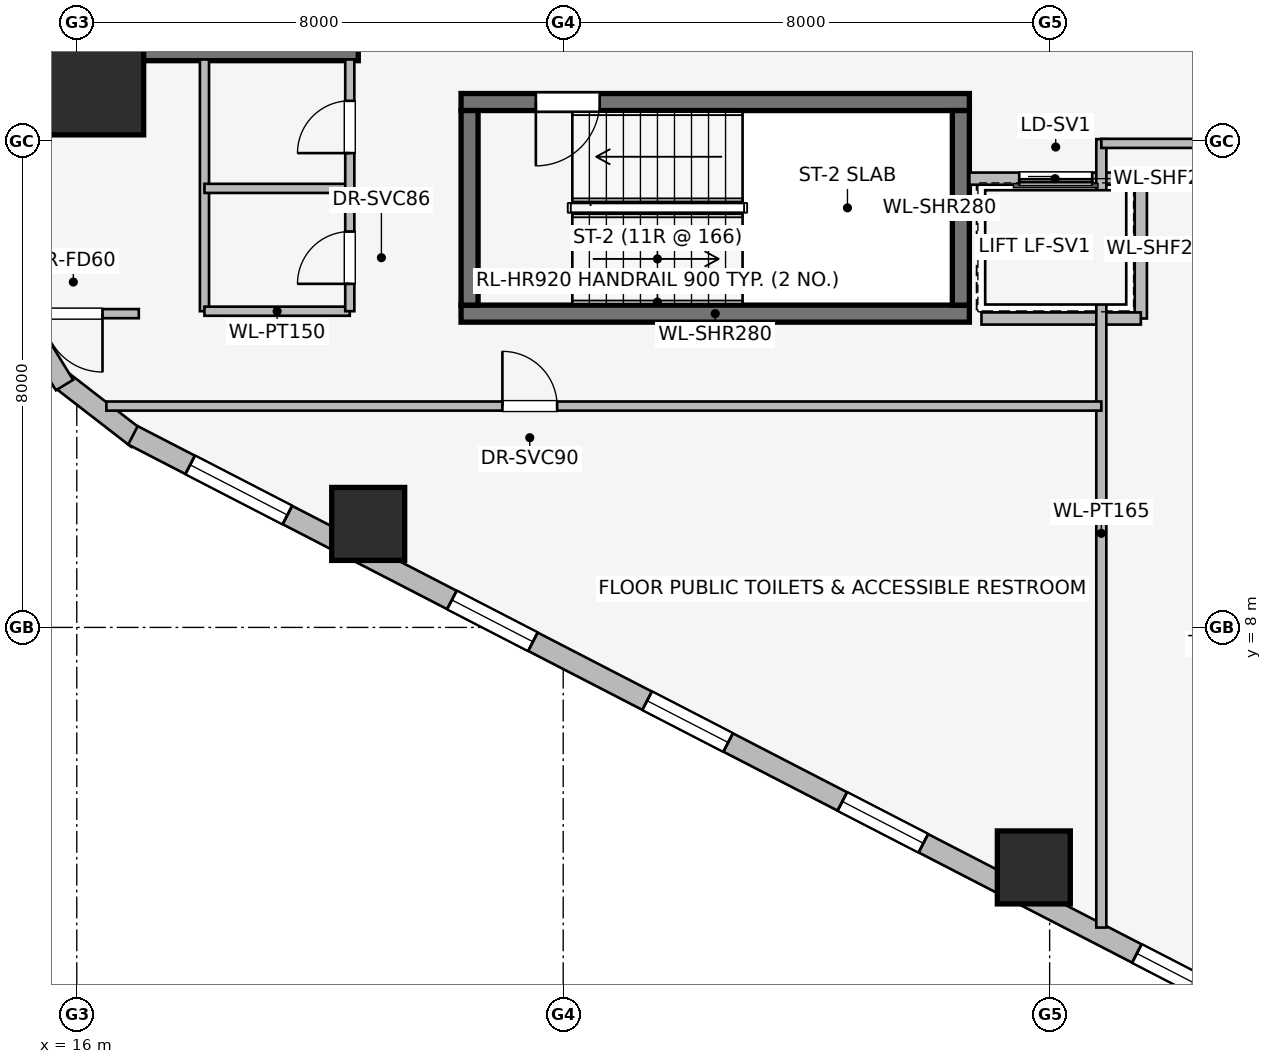
"""IFC4 building model, lengths in metres.
Left out: names, types, materials, properties, quantities, classifications, styles, units other than length and angle.
Written with IfcOpenShell. Run it as: python <this file> out.ifc"""

import sys

from ifc_helpers import new_model, si_unit, direction, frame, frame_2d, origin, origin_2d, place, context, subcontext, project, spatial, rectangle, extrude, element, fill, save


model = new_model("IFC4")
c1 = context("Model", 3, precision=1e-05, world=origin(), true_north=direction((0.0, 1.0)))
c2 = subcontext(c1, "Body", "Model", "MODEL_VIEW")
j1 = project(units=[si_unit("LENGTHUNIT", "METRE"), si_unit("PLANEANGLEUNIT", "RADIAN")], contexts=[c1])
p1 = place(None, origin())
s1 = spatial("IfcSite", under=j1, at=p1, CompositionType="ELEMENT")
p2 = place(p1, origin())
s2 = spatial("IfcBuilding", under=s1, at=p2, CompositionType="ELEMENT")
p3 = place(p2, frame((0.0, 0.0, 52.55)))
s3 = spatial("IfcBuildingStorey", under=s2, at=p3, CompositionType="ELEMENT", Elevation=52.55)
p4 = place(p3, frame((16.87, 17.46, 0.0), z_axis=(0.0, 0.0, 1.0), x_axis=(1.0, 0.0, 0.0)))
e1 = element("IfcWall", 1, at=p4, inside=s3, PredefinedType="SHEAR", context=c2, shape_type="SweptSolid", body=[
    extrude(rectangle(XDim=3.76, YDim=0.28, at=frame_2d((1.88, 0.0))), origin(), (0.0, 0.0, 1.0), 3.65),
])
p5 = place(p3, frame((22.32, 13.16, 0.0), z_axis=(0.0, 0.0, 1.0), x_axis=(1.0, 0.0, 0.0)))
e2 = element("IfcWall", 2, at=p5, inside=s3, PredefinedType="SHEAR", context=c2, shape_type="SweptSolid", body=[
    extrude(rectangle(XDim=8.36, YDim=0.28, at=frame_2d((4.18, 0.0))), origin(), (0.0, 0.0, 1.0), 3.65),
])
p6 = place(p3, frame((30.68, 16.64, 0.0), z_axis=(0.0, 0.0, 1.0), x_axis=(-1.0, 0.0, 0.0)))
e3 = element("IfcWall", 3, at=p6, inside=s3, PredefinedType="SHEAR", context=c2, shape_type="SweptSolid", body=[
    extrude(rectangle(XDim=8.36, YDim=0.28, at=frame_2d((4.18, 0.0))), origin(), (0.0, 0.0, 1.0), 3.65),
])
p7 = place(p6, frame((6.08, 0.0, 0.0)))
e4 = element("IfcOpeningElement", 4, at=p7, cuts=e3, PredefinedType="OPENING", context=c2, shape_type="SweptSolid", body=[
    extrude(rectangle(XDim=1.05, YDim=2.0, at=frame_2d((0.525, 1.0))), frame((0.0, 0.15, 0.0), z_axis=(0.0, -1.0, 0.0), x_axis=(1.0, 0.0, 0.0)), (0.0, 0.0, 1.0), 0.3),
])
for number, where, z_axis, x_axis in (
    (5, (22.46, 16.5, 0.0), (0.0, 0.0, 1.0), (0.0, -1.0, 0.0)),
    (6, (30.54, 13.3, 0.0), (0.0, 0.0, 1.0), (0.0, 1.0, 0.0)),
):
    element("IfcWall", number, at=place(p3, frame(where, z_axis=z_axis, x_axis=x_axis)), inside=s3, PredefinedType="SHEAR", context=c2, shape_type="SweptSolid", body=[
        extrude(rectangle(XDim=3.2, YDim=0.28, at=frame_2d((1.6, 0.0))), origin(), (0.0, 0.0, 1.0), 3.65),
    ])
p8 = place(p3, frame((16.3, 16.9, 0.0), z_axis=(0.0, 0.0, 1.0), x_axis=(1.0, 0.0, 0.0)))
e7 = element("IfcColumn", 7, at=p8, inside=s3, PredefinedType="COLUMN", context=c2, shape_type="SweptSolid", body=[
    extrude(rectangle(XDim=1.6, YDim=1.6, at=origin_2d()), origin(), (0.0, 0.0, 1.0), 3.65),
])
for number, where, z_axis, x_axis in (
    (8, (20.793, 9.702, 0.0), (0.0, 0.0, 1.0), (1.0, 0.0, 0.0)),
    (9, (31.74, 4.053, 0.0), (0.0, 0.0, 1.0), (1.0, 0.0, 0.0)),
):
    element("IfcColumn", number, at=place(p3, frame(where, z_axis=z_axis, x_axis=x_axis)), inside=s3, PredefinedType="COLUMN", context=c2, shape_type="SweptSolid", body=[
        extrude(rectangle(XDim=1.2, YDim=1.2, at=origin_2d()), origin(), (0.0, 0.0, 1.0), 3.65),
    ])
p9 = place(p3, frame((16.998, 11.099, 0.0), z_axis=(0.0, 0.0, 1.0), x_axis=(-0.790691856293, 0.61221433207, 0.0)))
e10 = element("IfcWall", 10, at=p9, inside=s3, PredefinedType="STANDARD", context=c2, shape_type="SweptSolid", body=[
    extrude(rectangle(XDim=1.676, YDim=0.33, at=frame_2d((0.838, 0.0))), origin(), (0.0, 0.0, 1.0), 3.36),
])
p10 = place(p3, frame((15.798, 11.985, 0.0), z_axis=(0.0, 0.0, 1.0), x_axis=(-0.520584129191, 0.853810379671, 0.0)))
e11 = element("IfcWall", 11, at=p10, inside=s3, PredefinedType="STANDARD", context=c2, shape_type="SweptSolid", body=[
    extrude(rectangle(XDim=1.677, YDim=0.33, at=frame_2d((0.838, 0.0))), origin(), (0.0, 0.0, 1.0), 3.36),
])
p11 = place(p3, frame((35.169, 1.743, 0.0), z_axis=(0.0, 0.0, 1.0), x_axis=(-0.888634413993, 0.458616264721, 0.0)))
e12 = element("IfcWall", 12, at=p11, inside=s3, PredefinedType="STANDARD", context=c2, shape_type="SweptSolid", body=[
    extrude(rectangle(XDim=20.531, YDim=0.34, at=frame_2d((10.266, 0.0))), origin(), (0.0, 0.0, 1.0), 2.654),
])
p12 = place(p11, frame((0.902, 0.0, 0.75)))
e13 = element("IfcOpeningElement", 13, at=p12, cuts=e12, PredefinedType="OPENING", context=c2, shape_type="SweptSolid", body=[
    extrude(rectangle(XDim=1.05, YDim=1.4, at=frame_2d((0.525, 0.7))), frame((0.0, 0.18, 0.0), z_axis=(0.0, -1.0, 0.0), x_axis=(1.0, 0.0, 0.0)), (0.0, 0.0, 1.0), 0.36),
])
p13 = place(p11, frame((5.903, 0.0, 0.75)))
e14 = element("IfcOpeningElement", 14, at=p13, cuts=e12, PredefinedType="OPENING", context=c2, shape_type="SweptSolid", body=[
    extrude(rectangle(XDim=1.5, YDim=1.5, at=frame_2d((0.75, 0.75))), frame((0.0, 0.18, 0.0), z_axis=(0.0, -1.0, 0.0), x_axis=(1.0, 0.0, 0.0)), (0.0, 0.0, 1.0), 0.36),
])
p14 = place(p11, frame((9.516, 0.0, 0.75)))
e15 = element("IfcOpeningElement", 15, at=p14, cuts=e12, PredefinedType="OPENING", context=c2, shape_type="SweptSolid", body=[
    extrude(rectangle(XDim=1.5, YDim=1.5, at=frame_2d((0.75, 0.75))), frame((0.0, 0.18, 0.0), z_axis=(0.0, -1.0, 0.0), x_axis=(1.0, 0.0, 0.0)), (0.0, 0.0, 1.0), 0.36),
])
p15 = place(p11, frame((13.129, 0.0, 0.75)))
e16 = element("IfcOpeningElement", 16, at=p15, cuts=e12, PredefinedType="OPENING", context=c2, shape_type="SweptSolid", body=[
    extrude(rectangle(XDim=1.5, YDim=1.5, at=frame_2d((0.75, 0.75))), frame((0.0, 0.18, 0.0), z_axis=(0.0, -1.0, 0.0), x_axis=(1.0, 0.0, 0.0)), (0.0, 0.0, 1.0), 0.36),
])
p16 = place(p11, frame((17.673, 0.0, 0.75)))
e17 = element("IfcOpeningElement", 17, at=p16, cuts=e12, PredefinedType="OPENING", context=c2, shape_type="SweptSolid", body=[
    extrude(rectangle(XDim=1.8, YDim=1.5, at=frame_2d((0.9, 0.75))), frame((0.0, 0.18, 0.0), z_axis=(0.0, -1.0, 0.0), x_axis=(1.0, 0.0, 0.0)), (0.0, 0.0, 1.0), 0.36),
])
p17 = place(p3, frame((33.5, 15.38, 0.0), z_axis=(0.0, 0.0, 1.0), x_axis=(-1.0, 0.0, 0.0)))
e18 = element("IfcWall", 18, at=p17, inside=s3, PredefinedType="PARTITIONING", context=c2, shape_type="SweptSolid", body=[
    extrude(rectangle(XDim=2.82, YDim=0.2, at=frame_2d((1.41, 0.0))), origin(), (0.0, 0.0, 1.0), 3.36),
])
p18 = place(p17, frame((0.8, 0.0, 0.0)))
e19 = element("IfcOpeningElement", 19, at=p18, cuts=e18, PredefinedType="OPENING", context=c2, shape_type="SweptSolid", body=[
    extrude(rectangle(XDim=1.2, YDim=2.2, at=frame_2d((0.6, 1.1))), frame((0.0, 0.11, 0.0), z_axis=(0.0, -1.0, 0.0), x_axis=(1.0, 0.0, 0.0)), (0.0, 0.0, 1.0), 0.22),
])
p19 = place(p3, frame((33.5, 13.08, 0.0), z_axis=(0.0, 0.0, 1.0), x_axis=(0.0, 1.0, 0.0)))
e20 = element("IfcWall", 20, at=p19, inside=s3, PredefinedType="PARTITIONING", context=c2, shape_type="SweptSolid", body=[
    extrude(rectangle(XDim=2.3, YDim=0.2, at=frame_2d((1.15, 0.0))), origin(), (0.0, 0.0, 1.0), 3.36),
])
p20 = place(p3, frame((30.879, 13.08, 0.0), z_axis=(0.0, 0.0, 1.0), x_axis=(1.0, 0.0, 0.0)))
e21 = element("IfcWall", 21, at=p20, inside=s3, PredefinedType="PARTITIONING", context=c2, shape_type="SweptSolid", body=[
    extrude(rectangle(XDim=2.621, YDim=0.2, at=frame_2d((1.311, 0.0))), origin(), (0.0, 0.0, 1.0), 3.36),
])
p21 = place(p3, frame((18.1, 17.34, 0.0), z_axis=(0.0, 0.0, 1.0), x_axis=(0.0, -1.0, 0.0)))
e22 = element("IfcWall", 22, at=p21, inside=s3, PredefinedType="PARTITIONING", context=c2, shape_type="SweptSolid", body=[
    extrude(rectangle(XDim=4.14, YDim=0.15, at=frame_2d((2.07, 0.0))), origin(), (0.0, 0.0, 1.0), 3.36),
])
for number, where, z_axis, x_axis in (
    (23, (18.1, 13.2, 0.0), (0.0, 0.0, 1.0), (1.0, 0.0, 0.0)),
    (24, (18.1, 15.22, 0.0), (0.0, 0.0, 1.0), (1.0, 0.0, 0.0)),
):
    element("IfcWall", number, at=place(p3, frame(where, z_axis=z_axis, x_axis=x_axis)), inside=s3, PredefinedType="PARTITIONING", context=c2, shape_type="SweptSolid", body=[
        extrude(rectangle(XDim=2.39, YDim=0.15, at=frame_2d((1.195, 0.0))), origin(), (0.0, 0.0, 1.0), 3.36),
    ])
p22 = place(p3, frame((20.49, 13.2, 0.0), z_axis=(0.0, 0.0, 1.0), x_axis=(0.0, 1.0, 0.0)))
e25 = element("IfcWall", 25, at=p22, inside=s3, PredefinedType="PARTITIONING", context=c2, shape_type="SweptSolid", body=[
    extrude(rectangle(XDim=4.14, YDim=0.15, at=frame_2d((2.07, 0.0))), origin(), (0.0, 0.0, 1.0), 3.36),
])
p23 = place(p22, frame((0.45, 0.0, 0.0)))
e26 = element("IfcOpeningElement", 26, at=p23, cuts=e25, PredefinedType="OPENING", context=c2, shape_type="SweptSolid", body=[
    extrude(rectangle(XDim=0.86, YDim=2.0, at=frame_2d((0.43, 1.0))), frame((0.0, 0.085, 0.0), z_axis=(0.0, -1.0, 0.0), x_axis=(1.0, 0.0, 0.0)), (0.0, 0.0, 1.0), 0.17),
])
p24 = place(p22, frame((2.6, 0.0, 0.0)))
e27 = element("IfcOpeningElement", 27, at=p24, cuts=e25, PredefinedType="OPENING", context=c2, shape_type="SweptSolid", body=[
    extrude(rectangle(XDim=0.86, YDim=2.0, at=frame_2d((0.43, 1.0))), frame((0.0, 0.085, 0.0), z_axis=(0.0, -1.0, 0.0), x_axis=(1.0, 0.0, 0.0)), (0.0, 0.0, 1.0), 0.17),
])
p25 = place(p3, frame((32.85, 3.064, 0.0), z_axis=(0.0, 0.0, 1.0), x_axis=(0.0, 1.0, 0.0)))
e28 = element("IfcWall", 28, at=p25, inside=s3, PredefinedType="PARTITIONING", context=c2, shape_type="SweptSolid", body=[
    extrude(rectangle(XDim=12.966, YDim=0.165, at=frame_2d((6.483, 0.0))), origin(), (0.0, 0.0, 1.0), 3.36),
])
p26 = place(p3, frame((16.487, 11.64, 0.0), z_axis=(0.0, 0.0, 1.0), x_axis=(1.0, 0.0, 0.0)))
e29 = element("IfcWall", 29, at=p26, inside=s3, PredefinedType="PARTITIONING", context=c2, shape_type="SweptSolid", body=[
    extrude(rectangle(XDim=16.363, YDim=0.15, at=frame_2d((8.182, 0.0))), origin(), (0.0, 0.0, 1.0), 3.36),
])
p27 = place(p26, frame((6.513, 0.0, 0.0)))
e30 = element("IfcOpeningElement", 30, at=p27, cuts=e29, PredefinedType="OPENING", context=c2, shape_type="SweptSolid", body=[
    extrude(rectangle(XDim=0.9, YDim=2.0, at=frame_2d((0.45, 1.0))), frame((0.0, 0.085, 0.0), z_axis=(0.0, -1.0, 0.0), x_axis=(1.0, 0.0, 0.0)), (0.0, 0.0, 1.0), 0.17),
])
p28 = place(p3, frame((17.02, 13.16, 0.0), z_axis=(0.0, 0.0, 1.0), x_axis=(-1.0, 0.0, 0.0)))
e31 = element("IfcWall", 31, at=p28, inside=s3, PredefinedType="PARTITIONING", context=c2, shape_type="SweptSolid", body=[
    extrude(rectangle(XDim=2.12, YDim=0.15, at=frame_2d((1.06, 0.0))), origin(), (0.0, 0.0, 1.0), 3.36),
])
p29 = place(p28, frame((0.597, 0.0, 0.0)))
e32 = element("IfcOpeningElement", 32, at=p29, cuts=e31, PredefinedType="OPENING", context=c2, shape_type="SweptSolid", body=[
    extrude(rectangle(XDim=0.96, YDim=2.0, at=frame_2d((0.48, 1.0))), frame((0.0, 0.085, 0.0), z_axis=(0.0, -1.0, 0.0), x_axis=(1.0, 0.0, 0.0)), (0.0, 0.0, 1.0), 0.17),
])
p30 = place(p3, frame((32.85, 15.96, 0.0), z_axis=(0.0, 0.0, 1.0), x_axis=(1.0, 0.0, 0.0)))
e33 = element("IfcWall", 33, at=p30, inside=s3, PredefinedType="PARTITIONING", context=c2, shape_type="SweptSolid", body=[
    extrude(rectangle(XDim=8.706, YDim=0.15, at=frame_2d((4.353, 0.0))), origin(), (0.0, 0.0, 1.0), 3.36),
])
p31 = place(p30, frame((3.873, 0.0, 0.0)))
e34 = element("IfcOpeningElement", 34, at=p31, cuts=e33, PredefinedType="OPENING", context=c2, shape_type="SweptSolid", body=[
    extrude(rectangle(XDim=0.96, YDim=2.0, at=frame_2d((0.48, 1.0))), frame((0.0, 0.085, 0.0), z_axis=(0.0, -1.0, 0.0), x_axis=(1.0, 0.0, 0.0)), (0.0, 0.0, 1.0), 0.17),
])
p32 = place(p12, origin())
e35 = element("IfcWindow", 35, at=p32, inside=s3, PartitioningType="SINGLE_PANEL", PredefinedType="WINDOW", context=c2, shape_type="SweptSolid", body=[
    extrude(rectangle(XDim=1.05, YDim=1.4, at=frame_2d((0.525, 0.7))), frame((0.0, 0.03, 0.0), z_axis=(0.0, -1.0, 0.0), x_axis=(1.0, 0.0, 0.0)), (0.0, 0.0, 1.0), 0.06),
])
fill(e13, e35)
p33 = place(p13, origin())
e36 = element("IfcWindow", 36, at=p33, inside=s3, PartitioningType="SINGLE_PANEL", PredefinedType="WINDOW", context=c2, shape_type="SweptSolid", body=[
    extrude(rectangle(XDim=1.5, YDim=1.5, at=frame_2d((0.75, 0.75))), frame((0.0, 0.03, 0.0), z_axis=(0.0, -1.0, 0.0), x_axis=(1.0, 0.0, 0.0)), (0.0, 0.0, 1.0), 0.06),
])
fill(e14, e36)
p34 = place(p14, origin())
e37 = element("IfcWindow", 37, at=p34, inside=s3, PartitioningType="SINGLE_PANEL", PredefinedType="WINDOW", context=c2, shape_type="SweptSolid", body=[
    extrude(rectangle(XDim=1.5, YDim=1.5, at=frame_2d((0.75, 0.75))), frame((0.0, 0.03, 0.0), z_axis=(0.0, -1.0, 0.0), x_axis=(1.0, 0.0, 0.0)), (0.0, 0.0, 1.0), 0.06),
])
fill(e15, e37)
p35 = place(p15, origin())
e38 = element("IfcWindow", 38, at=p35, inside=s3, PartitioningType="SINGLE_PANEL", PredefinedType="WINDOW", context=c2, shape_type="SweptSolid", body=[
    extrude(rectangle(XDim=1.5, YDim=1.5, at=frame_2d((0.75, 0.75))), frame((0.0, 0.03, 0.0), z_axis=(0.0, -1.0, 0.0), x_axis=(1.0, 0.0, 0.0)), (0.0, 0.0, 1.0), 0.06),
])
fill(e16, e38)
p36 = place(p16, origin())
e39 = element("IfcWindow", 39, at=p36, inside=s3, PartitioningType="SINGLE_PANEL", PredefinedType="WINDOW", context=c2, shape_type="SweptSolid", body=[
    extrude(rectangle(XDim=1.8, YDim=1.5, at=frame_2d((0.9, 0.75))), frame((0.0, 0.03, 0.0), z_axis=(0.0, -1.0, 0.0), x_axis=(1.0, 0.0, 0.0)), (0.0, 0.0, 1.0), 0.06),
])
fill(e17, e39)
p37 = place(p7, origin())
e40 = element("IfcDoor", 40, at=p37, inside=s3, OperationType="SINGLE_SWING_RIGHT", PredefinedType="DOOR", context=c2, shape_type="SweptSolid", body=[
    extrude(rectangle(XDim=1.05, YDim=2.0, at=frame_2d((0.525, 1.0))), frame((0.0, 0.025, 0.0), z_axis=(0.0, -1.0, 0.0), x_axis=(1.0, 0.0, 0.0)), (0.0, 0.0, 1.0), 0.05),
])
fill(e4, e40)
p38 = place(p18, origin())
e41 = element("IfcDoor", 41, at=p38, inside=s3, OperationType="SLIDING_TO_RIGHT", PredefinedType="DOOR", context=c2, shape_type="SweptSolid", body=[
    extrude(rectangle(XDim=1.2, YDim=2.2, at=frame_2d((0.6, 1.1))), frame((0.0, 0.025, 0.0), z_axis=(0.0, -1.0, 0.0), x_axis=(1.0, 0.0, 0.0)), (0.0, 0.0, 1.0), 0.05),
])
fill(e19, e41)
p39 = place(p23, origin())
e42 = element("IfcDoor", 42, at=p39, inside=s3, OperationType="SINGLE_SWING_LEFT", PredefinedType="DOOR", context=c2, shape_type="SweptSolid", body=[
    extrude(rectangle(XDim=0.86, YDim=2.0, at=frame_2d((0.43, 1.0))), frame((0.0, 0.025, 0.0), z_axis=(0.0, -1.0, 0.0), x_axis=(1.0, 0.0, 0.0)), (0.0, 0.0, 1.0), 0.05),
])
fill(e26, e42)
p40 = place(p24, origin())
e43 = element("IfcDoor", 43, at=p40, inside=s3, OperationType="SINGLE_SWING_LEFT", PredefinedType="DOOR", context=c2, shape_type="SweptSolid", body=[
    extrude(rectangle(XDim=0.86, YDim=2.0, at=frame_2d((0.43, 1.0))), frame((0.0, 0.025, 0.0), z_axis=(0.0, -1.0, 0.0), x_axis=(1.0, 0.0, 0.0)), (0.0, 0.0, 1.0), 0.05),
])
fill(e27, e43)
p41 = place(p27, origin())
e44 = element("IfcDoor", 44, at=p41, inside=s3, OperationType="SINGLE_SWING_LEFT", PredefinedType="DOOR", context=c2, shape_type="SweptSolid", body=[
    extrude(rectangle(XDim=0.9, YDim=2.0, at=frame_2d((0.45, 1.0))), frame((0.0, 0.025, 0.0), z_axis=(0.0, -1.0, 0.0), x_axis=(1.0, 0.0, 0.0)), (0.0, 0.0, 1.0), 0.05),
])
fill(e30, e44)
p42 = place(p29, origin())
e45 = element("IfcDoor", 45, at=p42, inside=s3, OperationType="SINGLE_SWING_LEFT", PredefinedType="DOOR", context=c2, shape_type="SweptSolid", body=[
    extrude(rectangle(XDim=0.96, YDim=2.0, at=frame_2d((0.48, 1.0))), frame((0.0, 0.025, 0.0), z_axis=(0.0, -1.0, 0.0), x_axis=(1.0, 0.0, 0.0)), (0.0, 0.0, 1.0), 0.05),
])
fill(e32, e45)
save(model, sys.argv[1])
